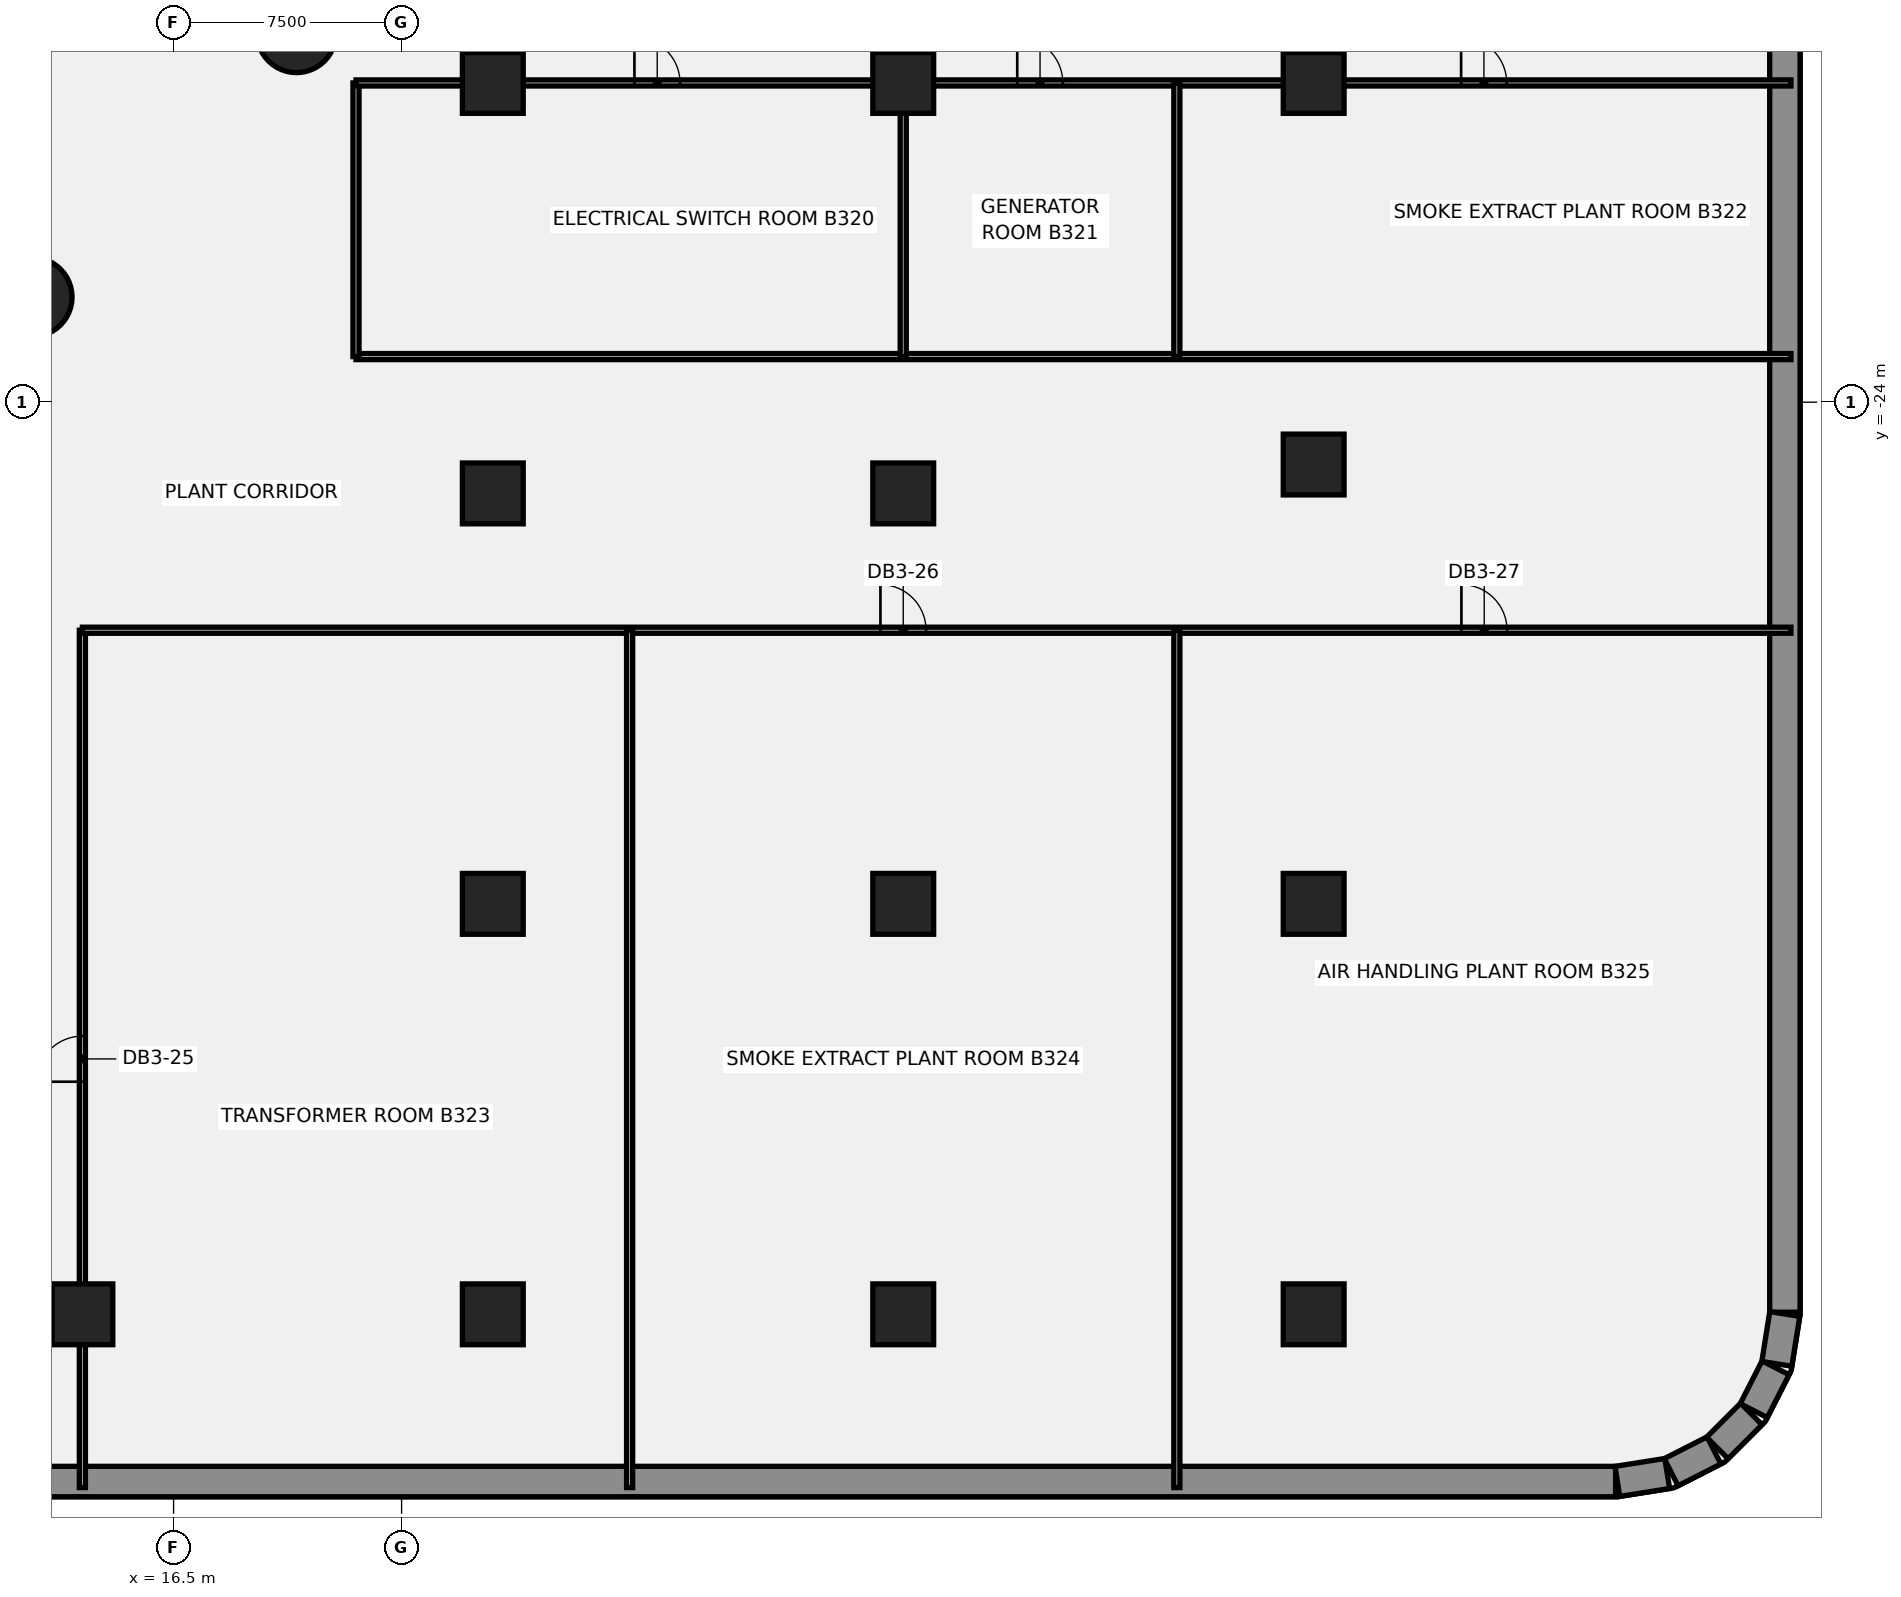
"""IFC4 building model, lengths in metres.
Left out: names, types, materials, properties, quantities, classifications, styles, units other than length and angle.
Written with IfcOpenShell. Run it as: python <this file> out.ifc"""

import sys

from ifc_helpers import new_model, si_unit, direction, frame, frame_2d, origin, origin_2d, place, context, subcontext, project, spatial, rectangle, circle, extrude, element, fill, save


model = new_model("IFC4")
c1 = context("Model", 3, precision=1e-05, world=origin(), true_north=direction((0.0, 1.0)))
c2 = subcontext(c1, "Body", "Model", "MODEL_VIEW")
j1 = project(units=[si_unit("LENGTHUNIT", "METRE"), si_unit("PLANEANGLEUNIT", "RADIAN")], contexts=[c1])
p1 = place(None, origin())
s1 = spatial("IfcSite", under=j1, at=p1, CompositionType="ELEMENT")
p2 = place(p1, origin())
s2 = spatial("IfcBuilding", under=s1, at=p2, CompositionType="ELEMENT")
p3 = place(p2, frame((0.0, 0.0, -21.0)))
s3 = spatial("IfcBuildingStorey", under=s2, at=p3, CompositionType="ELEMENT", Elevation=-21.0)
p4 = place(p3, frame((63.931, -59.5, -0.3), z_axis=(0.0, 0.0, 1.0), x_axis=(-1.0, 0.0, 0.0)))
e1 = element("IfcWall", 1, at=p4, inside=s3, PredefinedType="SOLIDWALL", context=c2, shape_type="SweptSolid", body=[
    extrude(rectangle(XDim=127.863, YDim=1.0, at=frame_2d((63.931, 0.0))), origin(), (0.0, 0.0, 1.0), 6.85),
])
p5 = place(p3, frame((69.5, 53.931, -0.3), z_axis=(0.0, 0.0, 1.0), x_axis=(0.0, -1.0, 0.0)))
e2 = element("IfcWall", 2, at=p5, inside=s3, PredefinedType="SOLIDWALL", context=c2, shape_type="SweptSolid", body=[
    extrude(rectangle(XDim=107.863, YDim=1.0, at=frame_2d((53.931, 0.0))), origin(), (0.0, 0.0, 1.0), 6.85),
])
p6 = place(p3, frame((69.495, -53.99, -0.3), z_axis=(0.0, 0.0, 1.0), x_axis=(-0.156430639922, -0.987688946427, 0.0)))
e3 = element("IfcWall", 3, at=p6, inside=s3, PredefinedType="SOLIDWALL", context=c2, shape_type="SweptSolid", body=[
    extrude(rectangle(XDim=1.661, YDim=1.0, at=frame_2d((0.83, 0.0))), origin(), (0.0, 0.0, 1.0), 6.85),
])
for number, where, z_axis, x_axis in (
    (4, (69.194, -55.759, -0.3), (0.0, 0.0, 1.0), (-0.454, -0.891, 0.0)),
    (5, (68.396, -57.278, -0.3), (0.0, 0.0, 1.0), (-0.707, -0.707, 0.0)),
    (6, (67.168, -58.476, -0.3), (0.0, 0.0, 1.0), (-0.891, -0.454, 0.0)),
):
    element("IfcWall", number, at=place(p3, frame(where, z_axis=z_axis, x_axis=x_axis)), inside=s3, PredefinedType="SOLIDWALL", context=c2, shape_type="SweptSolid", body=[
        extrude(rectangle(XDim=1.581, YDim=1.0, at=frame_2d((0.791, 0.0))), origin(), (0.0, 0.0, 1.0), 6.85),
    ])
p7 = place(p3, frame((65.63, -59.236, -0.3), z_axis=(0.0, 0.0, 1.0), x_axis=(-0.987688946427, -0.156430639922, 0.0)))
e7 = element("IfcWall", 7, at=p7, inside=s3, PredefinedType="SOLIDWALL", context=c2, shape_type="SweptSolid", body=[
    extrude(rectangle(XDim=1.661, YDim=1.0, at=frame_2d((0.83, 0.0))), origin(), (0.0, 0.0, 1.0), 6.85),
])
for number, where, z_axis, x_axis in (
    (8, (11.86, -20.543, -0.3), (0.0, 0.0, 1.0), (1.0, 0.0, 0.0)),
    (9, (20.543, -11.86, -0.3), (0.0, 0.0, 1.0), (1.0, 0.0, 0.0)),
):
    element("IfcColumn", number, at=place(p3, frame(where, z_axis=z_axis, x_axis=x_axis)), inside=s3, PredefinedType="COLUMN", context=c2, shape_type="SweptSolid", body=[
        extrude(circle(Radius=1.3, at=origin_2d()), origin(), (0.0, 0.0, 1.0), 6.85),
    ])
for number, where, z_axis, x_axis in (
    (10, (13.5, -54.0, -0.3), (0.0, 0.0, 1.0), (1.0, 0.0, 0.0)),
    (11, (27.0, -54.0, -0.3), (0.0, 0.0, 1.0), (1.0, 0.0, 0.0)),
    (12, (27.0, -40.5, -0.3), (0.0, 0.0, 1.0), (1.0, 0.0, 0.0)),
    (13, (27.0, -27.0, -0.3), (0.0, 0.0, 1.0), (1.0, 0.0, 0.0)),
    (14, (27.0, -13.5, -0.3), (0.0, 0.0, 1.0), (1.0, 0.0, 0.0)),
    (15, (40.5, -54.0, -0.3), (0.0, 0.0, 1.0), (1.0, 0.0, 0.0)),
    (16, (40.5, -40.5, -0.3), (0.0, 0.0, 1.0), (1.0, 0.0, 0.0)),
    (17, (40.5, -27.0, -0.3), (0.0, 0.0, 1.0), (1.0, 0.0, 0.0)),
    (18, (40.5, -13.5, -0.3), (0.0, 0.0, 1.0), (1.0, 0.0, 0.0)),
    (19, (54.0, -54.0, -0.3), (0.0, 0.0, 1.0), (1.0, 0.0, 0.0)),
    (20, (54.0, -40.5, -0.3), (0.0, 0.0, 1.0), (1.0, 0.0, 0.0)),
    (21, (54.0, -26.05, -0.3), (0.0, 0.0, 1.0), (1.0, 0.0, 0.0)),
    (22, (54.0, -13.5, -0.3), (0.0, 0.0, 1.0), (1.0, 0.0, 0.0)),
):
    element("IfcColumn", number, at=place(p3, frame(where, z_axis=z_axis, x_axis=x_axis)), inside=s3, PredefinedType="COLUMN", context=c2, shape_type="SweptSolid", body=[
        extrude(rectangle(XDim=2.0, YDim=2.0, at=origin_2d()), origin(), (0.0, 0.0, 1.0), 6.85),
    ])
p8 = place(p3, frame((13.5, -59.699, 0.0), z_axis=(0.0, 0.0, 1.0), x_axis=(0.0, 1.0, 0.0)))
e23 = element("IfcWall", 23, at=p8, inside=s3, PredefinedType="PARTITIONING", context=c2, shape_type="SweptSolid", body=[
    extrude(rectangle(XDim=28.199, YDim=0.2, at=frame_2d((14.1, 0.0))), origin(), (0.0, 0.0, 1.0), 6.55),
])
p9 = place(p8, frame((13.349, 0.0, 0.0)))
e24 = element("IfcOpeningElement", 24, at=p9, cuts=e23, PredefinedType="OPENING", context=c2, shape_type="SweptSolid", body=[
    extrude(rectangle(XDim=1.5, YDim=2.1, at=frame_2d((0.75, 1.05))), frame((0.0, 0.11, 0.0), z_axis=(0.0, -1.0, 0.0), x_axis=(1.0, 0.0, 0.0)), (0.0, 0.0, 1.0), 0.22),
])
p10 = place(p3, frame((13.5, -31.5, 0.0), z_axis=(0.0, 0.0, 1.0), x_axis=(1.0, 0.0, 0.0)))
e25 = element("IfcWall", 25, at=p10, inside=s3, PredefinedType="PARTITIONING", context=c2, shape_type="SweptSolid", body=[
    extrude(rectangle(XDim=56.199, YDim=0.2, at=frame_2d((28.1, 0.0))), origin(), (0.0, 0.0, 1.0), 6.55),
])
p11 = place(p10, frame((26.25, 0.0, 0.0)))
e26 = element("IfcOpeningElement", 26, at=p11, cuts=e25, PredefinedType="OPENING", context=c2, shape_type="SweptSolid", body=[
    extrude(rectangle(XDim=1.5, YDim=2.1, at=frame_2d((0.75, 1.05))), frame((0.0, 0.11, 0.0), z_axis=(0.0, -1.0, 0.0), x_axis=(1.0, 0.0, 0.0)), (0.0, 0.0, 1.0), 0.22),
])
p12 = place(p10, frame((45.36, 0.0, 0.0)))
e27 = element("IfcOpeningElement", 27, at=p12, cuts=e25, PredefinedType="OPENING", context=c2, shape_type="SweptSolid", body=[
    extrude(rectangle(XDim=1.5, YDim=2.1, at=frame_2d((0.75, 1.05))), frame((0.0, 0.11, 0.0), z_axis=(0.0, -1.0, 0.0), x_axis=(1.0, 0.0, 0.0)), (0.0, 0.0, 1.0), 0.22),
])
p13 = place(p3, frame((31.5, -59.699, 0.0), z_axis=(0.0, 0.0, 1.0), x_axis=(0.0, 1.0, 0.0)))
e28 = element("IfcWall", 28, at=p13, inside=s3, PredefinedType="PARTITIONING", context=c2, shape_type="SweptSolid", body=[
    extrude(rectangle(XDim=28.199, YDim=0.2, at=frame_2d((14.1, 0.0))), origin(), (0.0, 0.0, 1.0), 6.55),
])
p14 = place(p3, frame((22.5, -22.5, 0.0), z_axis=(0.0, 0.0, 1.0), x_axis=(1.0, 0.0, 0.0)))
e29 = element("IfcWall", 29, at=p14, inside=s3, PredefinedType="PARTITIONING", context=c2, shape_type="SweptSolid", body=[
    extrude(rectangle(XDim=47.199, YDim=0.2, at=frame_2d((23.6, 0.0))), origin(), (0.0, 0.0, 1.0), 6.55),
])
for number, where, z_axis, x_axis in (
    (30, (40.5, -22.5, 0.0), (0.0, 0.0, 1.0), (0.0, 1.0, 0.0)),
    (31, (22.5, -22.5, 0.0), (0.0, 0.0, 1.0), (0.0, 1.0, 0.0)),
):
    element("IfcWall", number, at=place(p3, frame(where, z_axis=z_axis, x_axis=x_axis)), inside=s3, PredefinedType="PARTITIONING", context=c2, shape_type="SweptSolid", body=[
        extrude(rectangle(XDim=9.0, YDim=0.2, at=frame_2d((4.5, 0.0))), origin(), (0.0, 0.0, 1.0), 6.55),
    ])
p15 = place(p3, frame((22.5, -13.5, 0.0), z_axis=(0.0, 0.0, 1.0), x_axis=(1.0, 0.0, 0.0)))
e32 = element("IfcWall", 32, at=p15, inside=s3, PredefinedType="PARTITIONING", context=c2, shape_type="SweptSolid", body=[
    extrude(rectangle(XDim=47.199, YDim=0.2, at=frame_2d((23.6, 0.0))), origin(), (0.0, 0.0, 1.0), 6.55),
])
p16 = place(p15, frame((9.158, 0.0, 0.0)))
e33 = element("IfcOpeningElement", 33, at=p16, cuts=e32, PredefinedType="OPENING", context=c2, shape_type="SweptSolid", body=[
    extrude(rectangle(XDim=1.5, YDim=2.1, at=frame_2d((0.75, 1.05))), frame((0.0, 0.11, 0.0), z_axis=(0.0, -1.0, 0.0), x_axis=(1.0, 0.0, 0.0)), (0.0, 0.0, 1.0), 0.22),
])
p17 = place(p15, frame((21.75, 0.0, 0.0)))
e34 = element("IfcOpeningElement", 34, at=p17, cuts=e32, PredefinedType="OPENING", context=c2, shape_type="SweptSolid", body=[
    extrude(rectangle(XDim=1.5, YDim=2.1, at=frame_2d((0.75, 1.05))), frame((0.0, 0.11, 0.0), z_axis=(0.0, -1.0, 0.0), x_axis=(1.0, 0.0, 0.0)), (0.0, 0.0, 1.0), 0.22),
])
p18 = place(p15, frame((36.35, 0.0, 0.0)))
e35 = element("IfcOpeningElement", 35, at=p18, cuts=e32, PredefinedType="OPENING", context=c2, shape_type="SweptSolid", body=[
    extrude(rectangle(XDim=1.5, YDim=2.1, at=frame_2d((0.75, 1.05))), frame((0.0, 0.11, 0.0), z_axis=(0.0, -1.0, 0.0), x_axis=(1.0, 0.0, 0.0)), (0.0, 0.0, 1.0), 0.22),
])
p19 = place(p3, frame((49.5, -59.699, 0.0), z_axis=(0.0, 0.0, 1.0), x_axis=(0.0, 1.0, 0.0)))
e36 = element("IfcWall", 36, at=p19, inside=s3, PredefinedType="PARTITIONING", context=c2, shape_type="SweptSolid", body=[
    extrude(rectangle(XDim=28.199, YDim=0.2, at=frame_2d((14.1, 0.0))), origin(), (0.0, 0.0, 1.0), 6.55),
])
p20 = place(p3, frame((49.5, -22.5, 0.0), z_axis=(0.0, 0.0, 1.0), x_axis=(0.0, 1.0, 0.0)))
e37 = element("IfcWall", 37, at=p20, inside=s3, PredefinedType="PARTITIONING", context=c2, shape_type="SweptSolid", body=[
    extrude(rectangle(XDim=9.0, YDim=0.2, at=frame_2d((4.5, 0.0))), origin(), (0.0, 0.0, 1.0), 6.55),
])
p21 = place(p16, origin())
e38 = element("IfcDoor", 38, at=p21, inside=s3, OperationType="SINGLE_SWING_RIGHT", PredefinedType="DOOR", context=c2, shape_type="SweptSolid", body=[
    extrude(rectangle(XDim=1.5, YDim=2.1, at=frame_2d((0.75, 1.05))), frame((0.0, 0.025, 0.0), z_axis=(0.0, -1.0, 0.0), x_axis=(1.0, 0.0, 0.0)), (0.0, 0.0, 1.0), 0.05),
])
fill(e33, e38)
p22 = place(p17, origin())
e39 = element("IfcDoor", 39, at=p22, inside=s3, OperationType="SINGLE_SWING_LEFT", PredefinedType="DOOR", context=c2, shape_type="SweptSolid", body=[
    extrude(rectangle(XDim=1.5, YDim=2.1, at=frame_2d((0.75, 1.05))), frame((0.0, 0.025, 0.0), z_axis=(0.0, -1.0, 0.0), x_axis=(1.0, 0.0, 0.0)), (0.0, 0.0, 1.0), 0.05),
])
fill(e34, e39)
p23 = place(p18, origin())
e40 = element("IfcDoor", 40, at=p23, inside=s3, OperationType="SINGLE_SWING_RIGHT", PredefinedType="DOOR", context=c2, shape_type="SweptSolid", body=[
    extrude(rectangle(XDim=1.5, YDim=2.1, at=frame_2d((0.75, 1.05))), frame((0.0, 0.025, 0.0), z_axis=(0.0, -1.0, 0.0), x_axis=(1.0, 0.0, 0.0)), (0.0, 0.0, 1.0), 0.05),
])
fill(e35, e40)
p24 = place(p9, origin())
e41 = element("IfcDoor", 41, at=p24, inside=s3, OperationType="SINGLE_SWING_LEFT", PredefinedType="DOOR", context=c2, shape_type="SweptSolid", body=[
    extrude(rectangle(XDim=1.5, YDim=2.1, at=frame_2d((0.75, 1.05))), frame((0.0, 0.025, 0.0), z_axis=(0.0, -1.0, 0.0), x_axis=(1.0, 0.0, 0.0)), (0.0, 0.0, 1.0), 0.05),
])
fill(e24, e41)
p25 = place(p11, origin())
e42 = element("IfcDoor", 42, at=p25, inside=s3, OperationType="SINGLE_SWING_RIGHT", PredefinedType="DOOR", context=c2, shape_type="SweptSolid", body=[
    extrude(rectangle(XDim=1.5, YDim=2.1, at=frame_2d((0.75, 1.05))), frame((0.0, 0.025, 0.0), z_axis=(0.0, -1.0, 0.0), x_axis=(1.0, 0.0, 0.0)), (0.0, 0.0, 1.0), 0.05),
])
fill(e26, e42)
p26 = place(p12, origin())
e43 = element("IfcDoor", 43, at=p26, inside=s3, OperationType="SINGLE_SWING_LEFT", PredefinedType="DOOR", context=c2, shape_type="SweptSolid", body=[
    extrude(rectangle(XDim=1.5, YDim=2.1, at=frame_2d((0.75, 1.05))), frame((0.0, 0.025, 0.0), z_axis=(0.0, -1.0, 0.0), x_axis=(1.0, 0.0, 0.0)), (0.0, 0.0, 1.0), 0.05),
])
fill(e27, e43)
save(model, sys.argv[1])
